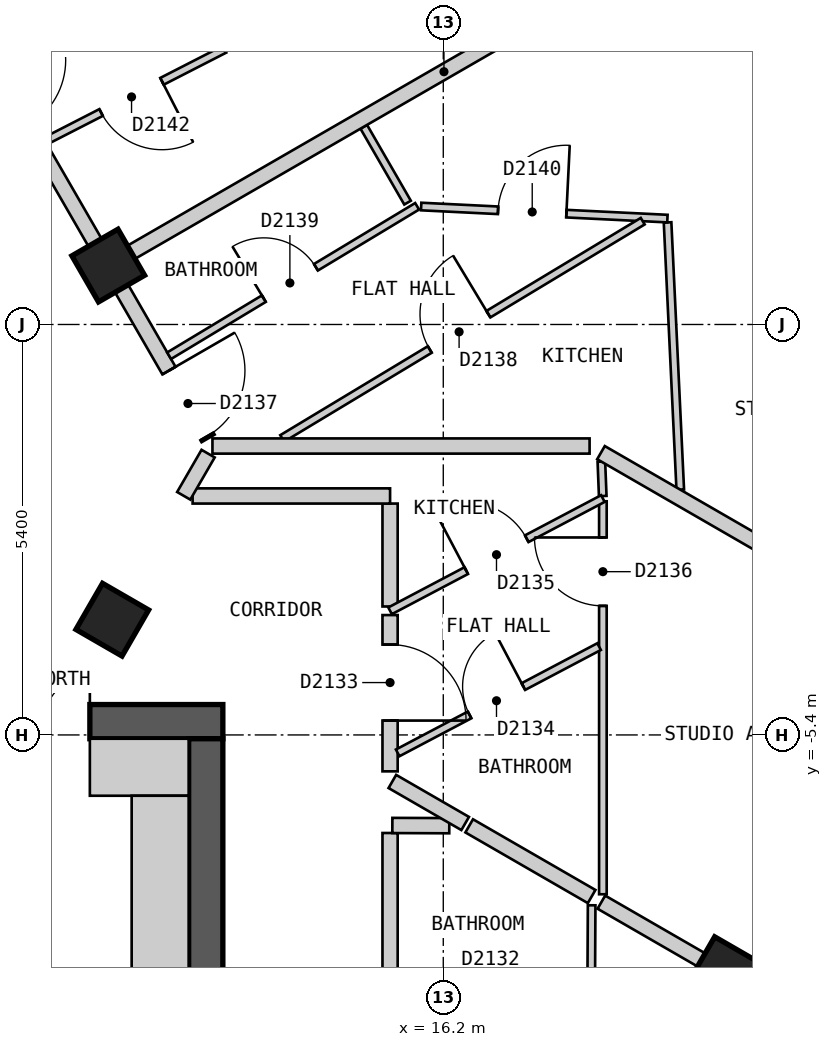
"""IFC4 building model, lengths in metres.
Left out: names, types, materials, properties, quantities, classifications, styles, units other than length and angle.
Written with IfcOpenShell. Run it as: python <this file> out.ifc"""

import sys

from ifc_helpers import new_model, si_unit, direction, frame, frame_2d, origin, origin_2d, place, context, subcontext, project, spatial, polyline, rectangle, outline, extrude, element, fill, save


model = new_model("IFC4")
c1 = context("Model", 3, precision=1e-05, world=origin(), true_north=direction((0.0, 1.0)))
c2 = subcontext(c1, "Body", "Model", "MODEL_VIEW")
j1 = project(units=[si_unit("LENGTHUNIT", "METRE"), si_unit("PLANEANGLEUNIT", "RADIAN")], contexts=[c1])
p1 = place(None, origin())
s1 = spatial("IfcSite", under=j1, at=p1, CompositionType="ELEMENT")
p2 = place(p1, origin())
s2 = spatial("IfcBuilding", under=s1, at=p2, CompositionType="ELEMENT")
p3 = place(p2, frame((0.0, 0.0, 217.8)))
s3 = spatial("IfcBuildingStorey", under=s2, at=p3, CompositionType="ELEMENT", Elevation=217.8)
for number, where, z_axis, x_axis in (
    (1, (19.899, -8.534, 0.0), (0.0, 0.0, 1.0), (0.5, 0.866, 0.0)),
    (2, (11.845, -3.884, 0.0), (0.0, 0.0, 1.0), (0.5, 0.866, 0.0)),
    (3, (11.792, 0.775, 0.0), (0.0, 0.0, 1.0), (-0.5, 0.866, 0.0)),
):
    element("IfcColumn", number, at=place(p3, frame(where, z_axis=z_axis, x_axis=x_axis)), inside=s3, PredefinedType="COLUMN", context=c2, shape_type="SweptSolid", body=[
        extrude(rectangle(XDim=0.7, YDim=0.7, at=origin_2d()), origin(), (0.0, 0.0, 1.0), 3.0),
    ])
p4 = place(p3, frame((-13.3, -5.225, 0.0), z_axis=(0.0, 0.0, 1.0), x_axis=(1.0, 0.0, 0.0)))
e4 = element("IfcWall", 4, at=p4, inside=s3, PredefinedType="SHEAR", context=c2, shape_type="SweptSolid", body=[
    extrude(rectangle(XDim=26.6, YDim=0.45, at=frame_2d((13.3, 0.0))), origin(), (0.0, 0.0, 1.0), 2.7),
])
p5 = place(p4, frame((23.65, 0.0, 0.0)))
e5 = element("IfcOpeningElement", 5, at=p5, cuts=e4, PredefinedType="OPENING", context=c2, shape_type="SweptSolid", body=[
    extrude(rectangle(XDim=1.2, YDim=2.1, at=frame_2d((0.6, 1.05))), frame((0.0, 0.235, 0.0), z_axis=(0.0, -1.0, 0.0), x_axis=(1.0, 0.0, 0.0)), (0.0, 0.0, 1.0), 0.47),
])
p6 = place(p3, frame((13.075, -18.55, 0.0), z_axis=(0.0, 0.0, 1.0), x_axis=(0.0, 1.0, 0.0)))
e6 = element("IfcWall", 6, at=p6, inside=s3, PredefinedType="SHEAR", context=c2, shape_type="SweptSolid", body=[
    extrude(rectangle(XDim=13.1, YDim=0.45, at=frame_2d((6.55, 0.0))), origin(), (0.0, 0.0, 1.0), 2.7),
])
p7 = place(p3, frame((15.285, -18.425, 0.0), z_axis=(0.0, 0.0, 1.0), x_axis=(0.500012653391, 0.866018098222, 0.0)))
e7 = element("IfcWall", 7, at=p7, inside=s3, PredefinedType="SOLIDWALL", context=c2, shape_type="SweptSolid", body=[
    extrude(outline(polyline([(0.0, -0.15), (16.628, -0.15), (16.548, 0.15), (0.08, 0.15), (0.0, -0.15)])), origin(), (0.0, 0.0, 1.0), 2.7),
])
p8 = place(p7, frame((2.444, 0.0, 0.15)))
e8 = element("IfcOpeningElement", 8, at=p8, cuts=e7, PredefinedType="OPENING", context=c2, shape_type="SweptSolid", body=[
    extrude(rectangle(XDim=1.5, YDim=2.1, at=frame_2d((0.75, 1.05))), frame((0.0, 0.16, 0.0), z_axis=(0.0, -1.0, 0.0), x_axis=(1.0, 0.0, 0.0)), (0.0, 0.0, 1.0), 0.32),
])
p9 = place(p7, frame((7.564, 0.0, 0.15)))
e9 = element("IfcOpeningElement", 9, at=p9, cuts=e7, PredefinedType="OPENING", context=c2, shape_type="SweptSolid", body=[
    extrude(rectangle(XDim=1.5, YDim=2.1, at=frame_2d((0.75, 1.05))), frame((0.0, 0.16, 0.0), z_axis=(0.0, -1.0, 0.0), x_axis=(1.0, 0.0, 0.0)), (0.0, 0.0, 1.0), 0.32),
])
p10 = place(p7, frame((12.682, 0.0, 0.15)))
e10 = element("IfcOpeningElement", 10, at=p10, cuts=e7, PredefinedType="OPENING", context=c2, shape_type="SweptSolid", body=[
    extrude(rectangle(XDim=1.5, YDim=2.1, at=frame_2d((0.75, 1.05))), frame((0.0, 0.16, 0.0), z_axis=(0.0, -1.0, 0.0), x_axis=(1.0, 0.0, 0.0)), (0.0, 0.0, 1.0), 0.32),
])
p11 = place(p3, frame((23.599, 0.825, 0.0), z_axis=(0.0, 0.0, 1.0), x_axis=(-0.500003656944, 0.866023292436, 0.0)))
e11 = element("IfcWall", 11, at=p11, inside=s3, PredefinedType="SOLIDWALL", context=c2, shape_type="SweptSolid", body=[
    extrude(outline(polyline([(0.0, -0.15), (22.17, -0.15), (22.09, 0.15), (0.08, 0.15), (0.0, -0.15)])), origin(), (0.0, 0.0, 1.0), 2.7),
])
p12 = place(p11, frame((2.497, 0.0, 0.15)))
e12 = element("IfcOpeningElement", 12, at=p12, cuts=e11, PredefinedType="OPENING", context=c2, shape_type="SweptSolid", body=[
    extrude(rectangle(XDim=1.5, YDim=2.1, at=frame_2d((0.75, 1.05))), frame((0.0, 0.16, 0.0), z_axis=(0.0, -1.0, 0.0), x_axis=(1.0, 0.0, 0.0)), (0.0, 0.0, 1.0), 0.32),
])
p13 = place(p11, frame((7.723, 0.0, 0.15)))
e13 = element("IfcOpeningElement", 13, at=p13, cuts=e11, PredefinedType="OPENING", context=c2, shape_type="SweptSolid", body=[
    extrude(rectangle(XDim=1.5, YDim=2.1, at=frame_2d((0.75, 1.05))), frame((0.0, 0.16, 0.0), z_axis=(0.0, -1.0, 0.0), x_axis=(1.0, 0.0, 0.0)), (0.0, 0.0, 1.0), 0.32),
])
p14 = place(p11, frame((12.948, 0.0, 0.15)))
e14 = element("IfcOpeningElement", 14, at=p14, cuts=e11, PredefinedType="OPENING", context=c2, shape_type="SweptSolid", body=[
    extrude(rectangle(XDim=1.5, YDim=2.1, at=frame_2d((0.75, 1.05))), frame((0.0, 0.16, 0.0), z_axis=(0.0, -1.0, 0.0), x_axis=(1.0, 0.0, 0.0)), (0.0, 0.0, 1.0), 0.32),
])
p15 = place(p11, frame((18.173, 0.0, 0.15)))
e15 = element("IfcOpeningElement", 15, at=p15, cuts=e11, PredefinedType="OPENING", context=c2, shape_type="SweptSolid", body=[
    extrude(rectangle(XDim=1.5, YDim=2.1, at=frame_2d((0.75, 1.05))), frame((0.0, 0.16, 0.0), z_axis=(0.0, -1.0, 0.0), x_axis=(1.0, 0.0, 0.0)), (0.0, 0.0, 1.0), 0.32),
])
p16 = place(p3, frame((9.238, 5.2, 0.0), z_axis=(0.0, 0.0, 1.0), x_axis=(0.500025705601, -0.86601056214, 0.0)))
e16 = element("IfcWall", 16, at=p16, inside=s3, PredefinedType="PARTITIONING", context=c2, shape_type="SweptSolid", body=[
    extrude(rectangle(XDim=7.735, YDim=0.2, at=frame_2d((3.868, 0.0))), origin(), (0.0, 0.0, 1.0), 2.7),
])
p17 = place(p16, frame((6.705, 0.0, 0.0)))
e17 = element("IfcOpeningElement", 17, at=p17, cuts=e16, PredefinedType="OPENING", context=c2, shape_type="SweptSolid", body=[
    extrude(rectangle(XDim=1.0, YDim=2.1, at=frame_2d((0.5, 1.05))), frame((0.0, 0.11, 0.0), z_axis=(0.0, -1.0, 0.0), x_axis=(1.0, 0.0, 0.0)), (0.0, 0.0, 1.0), 0.22),
])
p18 = place(p16, frame((1.988, 0.0, 0.0)))
e18 = element("IfcOpeningElement", 18, at=p18, cuts=e16, PredefinedType="OPENING", context=c2, shape_type="SweptSolid", body=[
    extrude(rectangle(XDim=1.0, YDim=2.1, at=frame_2d((0.5, 1.05))), frame((0.0, 0.11, 0.0), z_axis=(0.0, -1.0, 0.0), x_axis=(1.0, 0.0, 0.0)), (0.0, 0.0, 1.0), 0.22),
])
p19 = place(p3, frame((15.5, -2.356, 0.0), z_axis=(0.0, 0.0, 1.0), x_axis=(0.0, -1.0, 0.0)))
e19 = element("IfcWall", 19, at=p19, inside=s3, PredefinedType="PARTITIONING", context=c2, shape_type="SweptSolid", body=[
    extrude(rectangle(XDim=1.354, YDim=0.2, at=frame_2d((0.677, 0.0))), origin(), (0.0, 0.0, 1.0), 2.7),
])
p20 = place(p3, frame((12.902, -2.256, 0.0), z_axis=(0.0, 0.0, 1.0), x_axis=(1.0, 0.0, 0.0)))
e20 = element("IfcWall", 20, at=p20, inside=s3, PredefinedType="PARTITIONING", context=c2, shape_type="SweptSolid", body=[
    extrude(rectangle(XDim=2.598, YDim=0.2, at=frame_2d((1.299, 0.0))), origin(), (0.0, 0.0, 1.0), 2.7),
])
p21 = place(p3, frame((12.785, -2.254, 0.0), z_axis=(0.0, 0.0, 1.0), x_axis=(0.500766044352, 0.865582675903, 0.0)))
e21 = element("IfcWall", 21, at=p21, inside=s3, PredefinedType="PARTITIONING", context=c2, shape_type="SweptSolid", body=[
    extrude(rectangle(XDim=0.641, YDim=0.2, at=frame_2d((0.321, 0.0))), origin(), (0.0, 0.0, 1.0), 2.7),
])
p22 = place(p3, frame((15.5, -17.752, 0.0), z_axis=(0.0, 0.0, 1.0), x_axis=(0.0, 1.0, 0.0)))
e22 = element("IfcWall", 22, at=p22, inside=s3, PredefinedType="PARTITIONING", context=c2, shape_type="SweptSolid", body=[
    extrude(rectangle(XDim=11.062, YDim=0.2, at=frame_2d((5.531, 0.0))), origin(), (0.0, 0.0, 1.0), 2.7),
])
p23 = place(p22, frame((7.361, 0.0, 0.0)))
e23 = element("IfcOpeningElement", 23, at=p23, cuts=e22, PredefinedType="OPENING", context=c2, shape_type="SweptSolid", body=[
    extrude(rectangle(XDim=1.0, YDim=2.1, at=frame_2d((0.5, 1.05))), frame((0.0, 0.11, 0.0), z_axis=(0.0, -1.0, 0.0), x_axis=(1.0, 0.0, 0.0)), (0.0, 0.0, 1.0), 0.22),
])
p24 = place(p3, frame((15.5, -5.879, 0.0), z_axis=(0.0, 0.0, 1.0), x_axis=(0.0, 1.0, 0.0)))
e24 = element("IfcWall", 24, at=p24, inside=s3, PredefinedType="PARTITIONING", context=c2, shape_type="SweptSolid", body=[
    extrude(rectangle(XDim=2.056, YDim=0.2, at=frame_2d((1.028, 0.0))), origin(), (0.0, 0.0, 1.0), 2.7),
])
p25 = place(p24, frame((0.668, 0.0, 0.0)))
e25 = element("IfcOpeningElement", 25, at=p25, cuts=e24, PredefinedType="OPENING", context=c2, shape_type="SweptSolid", body=[
    extrude(rectangle(XDim=1.0, YDim=2.1, at=frame_2d((0.5, 1.05))), frame((0.0, 0.11, 0.0), z_axis=(0.0, -1.0, 0.0), x_axis=(1.0, 0.0, 0.0)), (0.0, 0.0, 1.0), 0.22),
])
p26 = place(p3, frame((15.154, 2.601, 0.0), z_axis=(0.0, 0.0, 1.0), x_axis=(0.499808046739, -0.866136199691, 0.0)))
e26 = element("IfcWall", 26, at=p26, inside=s3, PredefinedType="PARTITIONING", context=c2, shape_type="SweptSolid", body=[
    extrude(rectangle(XDim=1.152, YDim=0.1, at=frame_2d((0.576, 0.0))), origin(), (0.0, 0.0, 1.0), 2.7),
])
p27 = place(p3, frame((18.28, -1.804, 0.0), z_axis=(0.0, 0.0, 1.0), x_axis=(0.039839036731, -0.999206110446, 0.0)))
e27 = element("IfcWall", 27, at=p27, inside=s3, PredefinedType="PARTITIONING", context=c2, shape_type="SweptSolid", body=[
    extrude(rectangle(XDim=0.453, YDim=0.1, at=frame_2d((0.227, 0.0))), origin(), (0.0, 0.0, 1.0), 2.7),
])
p28 = place(p3, frame((19.151, 1.343, 0.0), z_axis=(0.0, 0.0, 1.0), x_axis=(0.047509130714, -0.998870803707, 0.0)))
e28 = element("IfcWall", 28, at=p28, inside=s3, PredefinedType="PARTITIONING", context=c2, shape_type="SweptSolid", body=[
    extrude(rectangle(XDim=3.52, YDim=0.1, at=frame_2d((1.76, 0.0))), origin(), (0.0, 0.0, 1.0), 2.7),
])
p29 = place(p3, frame((15.909, 1.552, 0.0), z_axis=(0.0, 0.0, 1.0), x_axis=(0.998799003463, -0.048995414909, 0.0)))
e29 = element("IfcWall", 29, at=p29, inside=s3, PredefinedType="PARTITIONING", context=c2, shape_type="SweptSolid", body=[
    extrude(rectangle(XDim=3.244, YDim=0.1, at=frame_2d((1.622, 0.0))), origin(), (0.0, 0.0, 1.0), 2.7),
])
p30 = place(p29, frame((1.013, 0.0, 0.0)))
e30 = element("IfcOpeningElement", 30, at=p30, cuts=e29, PredefinedType="OPENING", context=c2, shape_type="SweptSolid", body=[
    extrude(rectangle(XDim=0.9, YDim=2.1, at=frame_2d((0.45, 1.05))), frame((0.0, 0.06, 0.0), z_axis=(0.0, -1.0, 0.0), x_axis=(1.0, 0.0, 0.0)), (0.0, 0.0, 1.0), 0.12),
])
p31 = place(p3, frame((18.135, -10.893, 0.0), z_axis=(0.0, 0.0, 1.0), x_axis=(0.005255182688, 0.999986191432, 0.0)))
e31 = element("IfcWall", 31, at=p31, inside=s3, PredefinedType="PARTITIONING", context=c2, shape_type="SweptSolid", body=[
    extrude(rectangle(XDim=3.252, YDim=0.1, at=frame_2d((1.626, 0.0))), origin(), (0.0, 0.0, 1.0), 2.7),
])
p32 = place(p3, frame((18.3, -7.496, 0.0), z_axis=(0.0, 0.0, 1.0), x_axis=(0.0, 1.0, 0.0)))
e32 = element("IfcWall", 32, at=p32, inside=s3, PredefinedType="PARTITIONING", context=c2, shape_type="SweptSolid", body=[
    extrude(rectangle(XDim=5.17, YDim=0.1, at=frame_2d((2.585, 0.0))), origin(), (0.0, 0.0, 1.0), 2.7),
])
p33 = place(p32, frame((3.794, 0.0, 0.0)))
e33 = element("IfcOpeningElement", 33, at=p33, cuts=e32, PredefinedType="OPENING", context=c2, shape_type="SweptSolid", body=[
    extrude(rectangle(XDim=0.9, YDim=2.1, at=frame_2d((0.45, 1.05))), frame((0.0, 0.06, 0.0), z_axis=(0.0, -1.0, 0.0), x_axis=(1.0, 0.0, 0.0)), (0.0, 0.0, 1.0), 0.12),
])
p34 = place(p3, frame((10.963, 2.412, 0.0), z_axis=(0.0, 0.0, 1.0), x_axis=(0.889943997558, 0.456069820543, 0.0)))
e34 = element("IfcWall", 34, at=p34, inside=s3, PredefinedType="PARTITIONING", context=c2, shape_type="SweptSolid", body=[
    extrude(rectangle(XDim=2.651, YDim=0.1, at=frame_2d((1.325, 0.0))), origin(), (0.0, 0.0, 1.0), 2.7),
])
p35 = place(p34, frame((0.826, 0.0, 0.0)))
e35 = element("IfcOpeningElement", 35, at=p35, cuts=e34, PredefinedType="OPENING", context=c2, shape_type="SweptSolid", body=[
    extrude(rectangle(XDim=0.9, YDim=2.1, at=frame_2d((0.45, 1.05))), frame((0.0, 0.06, 0.0), z_axis=(0.0, -1.0, 0.0), x_axis=(1.0, 0.0, 0.0)), (0.0, 0.0, 1.0), 0.12),
])
p36 = place(p3, frame((15.5, -3.767, 0.0), z_axis=(0.0, 0.0, 1.0), x_axis=(0.884482889541, 0.466572628976, 0.0)))
e36 = element("IfcWall", 36, at=p36, inside=s3, PredefinedType="PARTITIONING", context=c2, shape_type="SweptSolid", body=[
    extrude(rectangle(XDim=3.166, YDim=0.1, at=frame_2d((1.583, 0.0))), origin(), (0.0, 0.0, 1.0), 2.7),
])
p37 = place(p36, frame((1.133, 0.0, 0.0)))
e37 = element("IfcOpeningElement", 37, at=p37, cuts=e36, PredefinedType="OPENING", context=c2, shape_type="SweptSolid", body=[
    extrude(rectangle(XDim=0.9, YDim=2.1, at=frame_2d((0.45, 1.05))), frame((0.0, 0.06, 0.0), z_axis=(0.0, -1.0, 0.0), x_axis=(1.0, 0.0, 0.0)), (0.0, 0.0, 1.0), 0.12),
])
p38 = place(p3, frame((15.6, -5.636, 0.0), z_axis=(0.0, 0.0, 1.0), x_axis=(0.884468832747, 0.466599275503, 0.0)))
e38 = element("IfcWall", 38, at=p38, inside=s3, PredefinedType="PARTITIONING", context=c2, shape_type="SweptSolid", body=[
    extrude(rectangle(XDim=2.996, YDim=0.1, at=frame_2d((1.498, 0.0))), origin(), (0.0, 0.0, 1.0), 2.7),
])
p39 = place(p38, frame((1.07, 0.0, 0.0)))
e39 = element("IfcOpeningElement", 39, at=p39, cuts=e38, PredefinedType="OPENING", context=c2, shape_type="SweptSolid", body=[
    extrude(rectangle(XDim=0.8, YDim=2.1, at=frame_2d((0.4, 1.05))), frame((0.0, 0.06, 0.0), z_axis=(0.0, -1.0, 0.0), x_axis=(1.0, 0.0, 0.0)), (0.0, 0.0, 1.0), 0.12),
])
p40 = place(p3, frame((12.593, -0.411, 0.0), z_axis=(0.0, 0.0, 1.0), x_axis=(0.856558445359, 0.516050026339, 0.0)))
e40 = element("IfcWall", 40, at=p40, inside=s3, PredefinedType="PARTITIONING", context=c2, shape_type="SweptSolid", body=[
    extrude(rectangle(XDim=3.809, YDim=0.1, at=frame_2d((1.905, 0.0))), origin(), (0.0, 0.0, 1.0), 2.7),
])
p41 = place(p40, frame((1.455, 0.0, 0.0)))
e41 = element("IfcOpeningElement", 41, at=p41, cuts=e40, PredefinedType="OPENING", context=c2, shape_type="SweptSolid", body=[
    extrude(rectangle(XDim=0.8, YDim=2.1, at=frame_2d((0.4, 1.05))), frame((0.0, 0.06, 0.0), z_axis=(0.0, -1.0, 0.0), x_axis=(1.0, 0.0, 0.0)), (0.0, 0.0, 1.0), 0.12),
])
p42 = place(p3, frame((14.081, -1.499, 0.0), z_axis=(0.0, 0.0, 1.0), x_axis=(0.85652273816, 0.516109289798, 0.0)))
e42 = element("IfcWall", 42, at=p42, inside=s3, PredefinedType="PARTITIONING", context=c2, shape_type="SweptSolid", body=[
    extrude(rectangle(XDim=5.537, YDim=0.1, at=frame_2d((2.769, 0.0))), origin(), (0.0, 0.0, 1.0), 2.7),
])
p43 = place(p42, frame((2.267, 0.0, 0.0)))
e43 = element("IfcOpeningElement", 43, at=p43, cuts=e42, PredefinedType="OPENING", context=c2, shape_type="SweptSolid", body=[
    extrude(rectangle(XDim=0.9, YDim=2.1, at=frame_2d((0.45, 1.05))), frame((0.0, 0.06, 0.0), z_axis=(0.0, -1.0, 0.0), x_axis=(1.0, 0.0, 0.0)), (0.0, 0.0, 1.0), 0.12),
])
p44 = place(p3, frame((15.53, -6.591, 0.0), z_axis=(0.0, 0.0, 1.0), x_axis=(0.999992350786, -0.003911312976, 0.0)))
e44 = element("IfcWall", 44, at=p44, inside=s3, PredefinedType="PARTITIONING", context=c2, shape_type="SweptSolid", body=[
    extrude(rectangle(XDim=0.749, YDim=0.2, at=frame_2d((0.375, 0.0))), origin(), (0.0, 0.0, 1.0), 2.7),
])
p45 = place(p3, frame((18.275, -1.686, 0.0), z_axis=(0.0, 0.0, 1.0), x_axis=(0.866041167766, -0.49997269499, 0.0)))
e45 = element("IfcWall", 45, at=p45, inside=s3, PredefinedType="PARTITIONING", context=c2, shape_type="SweptSolid", body=[
    extrude(rectangle(XDim=5.63, YDim=0.2, at=frame_2d((2.815, 0.0))), origin(), (0.0, 0.0, 1.0), 2.7),
])
p46 = place(p3, frame((15.53, -6.012, 0.0), z_axis=(0.0, 0.0, 1.0), x_axis=(0.866075331272, -0.499913513082, 0.0)))
e46 = element("IfcWall", 46, at=p46, inside=s3, PredefinedType="PARTITIONING", context=c2, shape_type="SweptSolid", body=[
    extrude(rectangle(XDim=1.106, YDim=0.2, at=frame_2d((0.553, 0.0))), origin(), (0.0, 0.0, 1.0), 2.7),
])
p47 = place(p3, frame((16.541, -6.596, 0.0), z_axis=(0.0, 0.0, 1.0), x_axis=(0.866078502609, -0.499908018857, 0.0)))
e47 = element("IfcWall", 47, at=p47, inside=s3, PredefinedType="PARTITIONING", context=c2, shape_type="SweptSolid", body=[
    extrude(rectangle(XDim=1.86, YDim=0.2, at=frame_2d((0.93, 0.0))), origin(), (0.0, 0.0, 1.0), 2.7),
])
p48 = place(p3, frame((18.28, -7.6, 0.0), z_axis=(0.0, 0.0, 1.0), x_axis=(0.866072847874, -0.499917815422, 0.0)))
e48 = element("IfcWall", 48, at=p48, inside=s3, PredefinedType="PARTITIONING", context=c2, shape_type="SweptSolid", body=[
    extrude(rectangle(XDim=2.668, YDim=0.2, at=frame_2d((1.334, 0.0))), origin(), (0.0, 0.0, 1.0), 2.7),
])
p49 = place(p3, frame((13.163, -1.599, 0.0), z_axis=(0.0, 0.0, 1.0), x_axis=(1.0, 0.0, 0.0)))
e49 = element("IfcWall", 49, at=p49, inside=s3, PredefinedType="PARTITIONING", context=c2, shape_type="SweptSolid", body=[
    extrude(rectangle(XDim=4.962, YDim=0.2, at=frame_2d((2.481, 0.0))), origin(), (0.0, 0.0, 1.0), 2.7),
])
p50 = place(p3, frame((11.879, 0.826, 0.0), z_axis=(0.0, 0.0, 1.0), x_axis=(0.866065245018, 0.499930986609, 0.0)))
e50 = element("IfcWall", 50, at=p50, inside=s3, PredefinedType="PARTITIONING", context=c2, shape_type="SweptSolid", body=[
    extrude(rectangle(XDim=10.0, YDim=0.2, at=frame_2d((5.0, 0.0))), origin(), (0.0, 0.0, 1.0), 2.7),
])
p51 = place(p3, frame((11.55, -5.825, 0.0), z_axis=(0.0, 0.0, 1.0), x_axis=(1.0, 0.0, 0.0)))
e51 = element("IfcWall", 51, at=p51, inside=s3, PredefinedType="PARTITIONING", context=c2, shape_type="SweptSolid", body=[
    extrude(rectangle(XDim=1.3, YDim=0.75, at=frame_2d((0.65, 0.0))), origin(), (0.0, 0.0, 1.0), 2.7),
])
p52 = place(p3, frame((12.475, -14.45, 0.0), z_axis=(0.0, 0.0, 1.0), x_axis=(0.0, 1.0, 0.0)))
e52 = element("IfcWall", 52, at=p52, inside=s3, PredefinedType="PARTITIONING", context=c2, shape_type="SweptSolid", body=[
    extrude(rectangle(XDim=8.25, YDim=0.75, at=frame_2d((4.125, 0.0))), origin(), (0.0, 0.0, 1.0), 2.7),
])
p53 = place(p25, origin())
e53 = element("IfcDoor", 53, at=p53, inside=s3, OperationType="SINGLE_SWING_LEFT", PredefinedType="DOOR", context=c2, shape_type="SweptSolid", body=[
    extrude(rectangle(XDim=1.0, YDim=2.1, at=frame_2d((0.5, 1.05))), frame((0.0, 0.025, 0.0), z_axis=(0.0, -1.0, 0.0), x_axis=(1.0, 0.0, 0.0)), (0.0, 0.0, 1.0), 0.05),
])
fill(e25, e53)
p54 = place(p39, origin())
e54 = element("IfcDoor", 54, at=p54, inside=s3, OperationType="SINGLE_SWING_RIGHT", PredefinedType="DOOR", context=c2, shape_type="SweptSolid", body=[
    extrude(rectangle(XDim=0.8, YDim=2.1, at=frame_2d((0.4, 1.05))), frame((0.0, 0.025, 0.0), z_axis=(0.0, -1.0, 0.0), x_axis=(1.0, 0.0, 0.0)), (0.0, 0.0, 1.0), 0.05),
])
fill(e39, e54)
p55 = place(p37, origin())
e55 = element("IfcDoor", 55, at=p55, inside=s3, OperationType="SINGLE_SWING_LEFT", PredefinedType="DOOR", context=c2, shape_type="SweptSolid", body=[
    extrude(rectangle(XDim=0.9, YDim=2.1, at=frame_2d((0.45, 1.05))), frame((0.0, 0.025, 0.0), z_axis=(0.0, -1.0, 0.0), x_axis=(1.0, 0.0, 0.0)), (0.0, 0.0, 1.0), 0.05),
])
fill(e37, e55)
p56 = place(p33, origin())
e56 = element("IfcDoor", 56, at=p56, inside=s3, OperationType="SINGLE_SWING_RIGHT", PredefinedType="DOOR", context=c2, shape_type="SweptSolid", body=[
    extrude(rectangle(XDim=0.9, YDim=2.1, at=frame_2d((0.45, 1.05))), frame((0.0, 0.025, 0.0), z_axis=(0.0, -1.0, 0.0), x_axis=(1.0, 0.0, 0.0)), (0.0, 0.0, 1.0), 0.05),
])
fill(e33, e56)
p57 = place(p17, origin())
e57 = element("IfcDoor", 57, at=p57, inside=s3, OperationType="SINGLE_SWING_LEFT", PredefinedType="DOOR", context=c2, shape_type="SweptSolid", body=[
    extrude(rectangle(XDim=1.0, YDim=2.1, at=frame_2d((0.5, 1.05))), frame((0.0, 0.025, 0.0), z_axis=(0.0, -1.0, 0.0), x_axis=(1.0, 0.0, 0.0)), (0.0, 0.0, 1.0), 0.05),
])
fill(e17, e57)
p58 = place(p43, origin())
e58 = element("IfcDoor", 58, at=p58, inside=s3, OperationType="SINGLE_SWING_RIGHT", PredefinedType="DOOR", context=c2, shape_type="SweptSolid", body=[
    extrude(rectangle(XDim=0.9, YDim=2.1, at=frame_2d((0.45, 1.05))), frame((0.0, 0.025, 0.0), z_axis=(0.0, -1.0, 0.0), x_axis=(1.0, 0.0, 0.0)), (0.0, 0.0, 1.0), 0.05),
])
fill(e43, e58)
p59 = place(p41, origin())
e59 = element("IfcDoor", 59, at=p59, inside=s3, OperationType="SINGLE_SWING_LEFT", PredefinedType="DOOR", context=c2, shape_type="SweptSolid", body=[
    extrude(rectangle(XDim=0.8, YDim=2.1, at=frame_2d((0.4, 1.05))), frame((0.0, 0.025, 0.0), z_axis=(0.0, -1.0, 0.0), x_axis=(1.0, 0.0, 0.0)), (0.0, 0.0, 1.0), 0.05),
])
fill(e41, e59)
p60 = place(p30, origin())
e60 = element("IfcDoor", 60, at=p60, inside=s3, OperationType="SINGLE_SWING_RIGHT", PredefinedType="DOOR", context=c2, shape_type="SweptSolid", body=[
    extrude(rectangle(XDim=0.9, YDim=2.1, at=frame_2d((0.45, 1.05))), frame((0.0, 0.025, 0.0), z_axis=(0.0, -1.0, 0.0), x_axis=(1.0, 0.0, 0.0)), (0.0, 0.0, 1.0), 0.05),
])
fill(e30, e60)
p61 = place(p35, origin())
e61 = element("IfcDoor", 61, at=p61, inside=s3, OperationType="SINGLE_SWING_RIGHT", PredefinedType="DOOR", context=c2, shape_type="SweptSolid", body=[
    extrude(rectangle(XDim=0.9, YDim=2.1, at=frame_2d((0.45, 1.05))), frame((0.0, 0.025, 0.0), z_axis=(0.0, -1.0, 0.0), x_axis=(1.0, 0.0, 0.0)), (0.0, 0.0, 1.0), 0.05),
])
fill(e35, e61)
p62 = place(p5, origin())
e62 = element("IfcDoor", 62, at=p62, inside=s3, OperationType="DOUBLE_DOOR_SINGLE_SWING", PredefinedType="DOOR", context=c2, shape_type="SweptSolid", body=[
    extrude(rectangle(XDim=1.2, YDim=2.1, at=frame_2d((0.6, 1.05))), frame((0.0, 0.025, 0.0), z_axis=(0.0, -1.0, 0.0), x_axis=(1.0, 0.0, 0.0)), (0.0, 0.0, 1.0), 0.05),
])
fill(e5, e62)
save(model, sys.argv[1])
